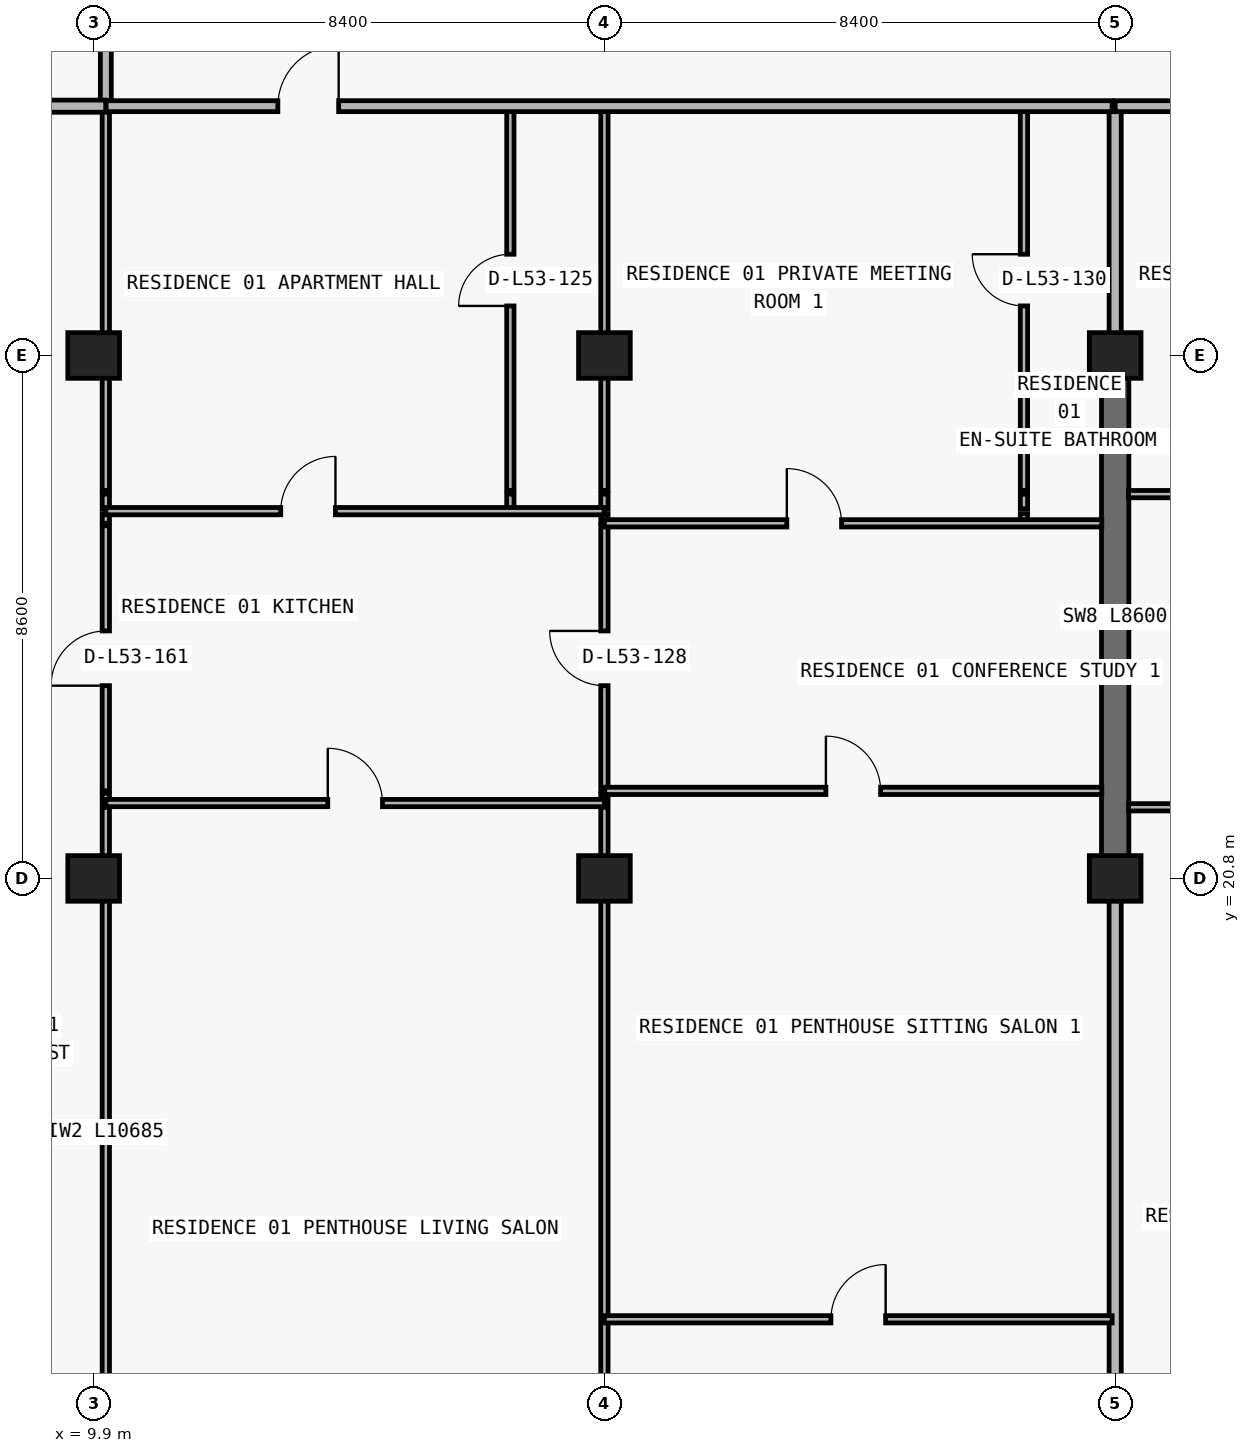
"""IFC4 building model, lengths in metres.
Left out: names, types, materials, properties, quantities, classifications, styles, units other than length and angle.
Written with IfcOpenShell. Run it as: python <this file> out.ifc"""

import sys

from ifc_helpers import new_model, si_unit, direction, frame, frame_2d, origin, origin_2d, place, context, subcontext, project, spatial, rectangle, extrude, element, fill, save


model = new_model("IFC4")
c1 = context("Model", 3, precision=1e-05, world=origin(), true_north=direction((0.0, 1.0)))
c2 = subcontext(c1, "Body", "Model", "MODEL_VIEW")
j1 = project(units=[si_unit("LENGTHUNIT", "METRE"), si_unit("PLANEANGLEUNIT", "RADIAN")], contexts=[c1])
p1 = place(None, origin())
s1 = spatial("IfcSite", under=j1, at=p1, CompositionType="ELEMENT")
p2 = place(p1, origin())
s2 = spatial("IfcBuilding", under=s1, at=p2, CompositionType="ELEMENT")
p3 = place(p2, frame((0.0, 0.0, 191.7)))
s3 = spatial("IfcBuildingStorey", under=s2, at=p3, CompositionType="ELEMENT", Elevation=191.7)
for number, where, z_axis, x_axis in (
    (1, (9.9, 20.8, 0.0), (0.0, 0.0, 1.0), (1.0, 0.0, 0.0)),
    (2, (18.3, 20.8, 0.0), (0.0, 0.0, 1.0), (1.0, 0.0, 0.0)),
    (3, (26.7, 20.8, 0.0), (0.0, 0.0, 1.0), (1.0, 0.0, 0.0)),
    (4, (9.9, 29.4, 0.0), (0.0, 0.0, 1.0), (1.0, 0.0, 0.0)),
    (5, (18.3, 29.4, 0.0), (0.0, 0.0, 1.0), (1.0, 0.0, 0.0)),
    (6, (26.7, 29.4, 0.0), (0.0, 0.0, 1.0), (1.0, 0.0, 0.0)),
):
    element("IfcColumn", number, at=place(p3, frame(where, z_axis=z_axis, x_axis=x_axis)), inside=s3, PredefinedType="COLUMN", context=c2, shape_type="SweptSolid", body=[
        extrude(rectangle(XDim=0.85, YDim=0.75, at=origin_2d()), origin(), (0.0, 0.0, 1.0), 3.05),
    ])
p4 = place(p3, frame((26.7, 20.8, 0.0), z_axis=(0.0, 0.0, 1.0), x_axis=(0.0, 1.0, 0.0)))
e7 = element("IfcWall", 7, at=p4, inside=s3, PredefinedType="SHEAR", context=c2, shape_type="SweptSolid", body=[
    extrude(rectangle(XDim=8.6, YDim=0.45, at=frame_2d((4.3, 0.0))), origin(), (0.0, 0.0, 1.0), 3.05),
])
p5 = place(p3, frame((10.1, 11.285, 0.0), z_axis=(0.0, 0.0, 1.0), x_axis=(0.0, 1.0, 0.0)))
e8 = element("IfcWall", 8, at=p5, inside=s3, PredefinedType="PARTITIONING", context=c2, shape_type="SweptSolid", body=[
    extrude(rectangle(XDim=10.685, YDim=0.12, at=frame_2d((5.343, 0.0))), origin(), (0.0, 0.0, 1.0), 2.263),
])
p6 = place(p3, frame((10.1, 22.04, 0.0), z_axis=(0.0, 0.0, 1.0), x_axis=(0.0, 1.0, 0.0)))
e9 = element("IfcWall", 9, at=p6, inside=s3, PredefinedType="PARTITIONING", context=c2, shape_type="SweptSolid", body=[
    extrude(rectangle(XDim=0.16, YDim=0.12, at=frame_2d((0.08, 0.0))), origin(), (0.0, 0.0, 1.0), 2.263),
])
p7 = place(p3, frame((10.1, 22.24, 0.0), z_axis=(0.0, 0.0, 1.0), x_axis=(0.0, 1.0, 0.0)))
e10 = element("IfcWall", 10, at=p7, inside=s3, PredefinedType="PARTITIONING", context=c2, shape_type="SweptSolid", body=[
    extrude(rectangle(XDim=4.36, YDim=0.12, at=frame_2d((2.18, 0.0))), origin(), (0.0, 0.0, 1.0), 2.263),
])
p8 = place(p7, frame((1.73, 0.0, 0.0)))
e11 = element("IfcOpeningElement", 11, at=p8, cuts=e10, PredefinedType="OPENING", context=c2, shape_type="SweptSolid", body=[
    extrude(rectangle(XDim=0.9, YDim=2.15, at=frame_2d((0.45, 1.075))), frame((0.0, 0.07, 0.0), z_axis=(0.0, -1.0, 0.0), x_axis=(1.0, 0.0, 0.0)), (0.0, 0.0, 1.0), 0.14),
])
p9 = place(p3, frame((10.1, 26.64, 0.0), z_axis=(0.0, 0.0, 1.0), x_axis=(0.0, 1.0, 0.0)))
e12 = element("IfcWall", 12, at=p9, inside=s3, PredefinedType="PARTITIONING", context=c2, shape_type="SweptSolid", body=[
    extrude(rectangle(XDim=0.16, YDim=0.12, at=frame_2d((0.08, 0.0))), origin(), (0.0, 0.0, 1.0), 2.263),
])
p10 = place(p3, frame((10.1, 26.88, 0.0), z_axis=(0.0, 0.0, 1.0), x_axis=(0.0, 1.0, 0.0)))
e13 = element("IfcWall", 13, at=p10, inside=s3, PredefinedType="PARTITIONING", context=c2, shape_type="SweptSolid", body=[
    extrude(rectangle(XDim=0.24, YDim=0.12, at=frame_2d((0.12, 0.0))), origin(), (0.0, 0.0, 1.0), 2.263),
])
p11 = place(p3, frame((10.1, 27.18, 0.0), z_axis=(0.0, 0.0, 1.0), x_axis=(0.0, 1.0, 0.0)))
e14 = element("IfcWall", 14, at=p11, inside=s3, PredefinedType="PARTITIONING", context=c2, shape_type="SweptSolid", body=[
    extrude(rectangle(XDim=6.32, YDim=0.12, at=frame_2d((3.16, 0.0))), origin(), (0.0, 0.0, 1.0), 2.263),
])
p12 = place(p3, frame((10.1, 33.505, 0.0), z_axis=(0.0, 0.0, 1.0), x_axis=(0.0, 1.0, 0.0)))
e15 = element("IfcWall", 15, at=p12, inside=s3, PredefinedType="PARTITIONING", context=c2, shape_type="SweptSolid", body=[
    extrude(rectangle(XDim=3.495, YDim=0.18, at=frame_2d((1.748, 0.0))), origin(), (0.0, 0.0, 1.0), 2.263),
])
p13 = place(p3, frame((16.753, 26.88, 0.0), z_axis=(0.0, 0.0, 1.0), x_axis=(0.0, 1.0, 0.0)))
e16 = element("IfcWall", 16, at=p13, inside=s3, PredefinedType="PARTITIONING", context=c2, shape_type="SweptSolid", body=[
    extrude(rectangle(XDim=0.24, YDim=0.12, at=frame_2d((0.12, 0.0))), origin(), (0.0, 0.0, 1.0), 3.05),
])
p14 = place(p3, frame((16.753, 27.18, 0.0), z_axis=(0.0, 0.0, 1.0), x_axis=(0.0, 1.0, 0.0)))
e17 = element("IfcWall", 17, at=p14, inside=s3, PredefinedType="PARTITIONING", context=c2, shape_type="SweptSolid", body=[
    extrude(rectangle(XDim=6.32, YDim=0.12, at=frame_2d((3.16, 0.0))), origin(), (0.0, 0.0, 1.0), 3.05),
])
p15 = place(p14, frame((3.035, 0.0, 0.0)))
e18 = element("IfcOpeningElement", 18, at=p15, cuts=e17, PredefinedType="OPENING", context=c2, shape_type="SweptSolid", body=[
    extrude(rectangle(XDim=0.85, YDim=2.1, at=frame_2d((0.425, 1.05))), frame((0.0, 0.07, 0.0), z_axis=(0.0, -1.0, 0.0), x_axis=(1.0, 0.0, 0.0)), (0.0, 0.0, 1.0), 0.14),
])
p16 = place(p3, frame((18.3, 11.24, 0.0), z_axis=(0.0, 0.0, 1.0), x_axis=(0.0, 1.0, 0.0)))
e19 = element("IfcWall", 19, at=p16, inside=s3, PredefinedType="PARTITIONING", context=c2, shape_type="SweptSolid", body=[
    extrude(rectangle(XDim=10.73, YDim=0.12, at=frame_2d((5.365, 0.0))), origin(), (0.0, 0.0, 1.0), 2.263),
])
p17 = place(p3, frame((18.3, 22.04, 0.0), z_axis=(0.0, 0.0, 1.0), x_axis=(0.0, 1.0, 0.0)))
e20 = element("IfcWall", 20, at=p17, inside=s3, PredefinedType="PARTITIONING", context=c2, shape_type="SweptSolid", body=[
    extrude(rectangle(XDim=0.16, YDim=0.12, at=frame_2d((0.08, 0.0))), origin(), (0.0, 0.0, 1.0), 2.263),
])
p18 = place(p3, frame((18.3, 22.24, 0.0), z_axis=(0.0, 0.0, 1.0), x_axis=(0.0, 1.0, 0.0)))
e21 = element("IfcWall", 21, at=p18, inside=s3, PredefinedType="PARTITIONING", context=c2, shape_type="SweptSolid", body=[
    extrude(rectangle(XDim=4.36, YDim=0.12, at=frame_2d((2.18, 0.0))), origin(), (0.0, 0.0, 1.0), 2.263),
])
p19 = place(p18, frame((1.73, 0.0, 0.0)))
e22 = element("IfcOpeningElement", 22, at=p19, cuts=e21, PredefinedType="OPENING", context=c2, shape_type="SweptSolid", body=[
    extrude(rectangle(XDim=0.9, YDim=2.15, at=frame_2d((0.45, 1.075))), frame((0.0, 0.07, 0.0), z_axis=(0.0, -1.0, 0.0), x_axis=(1.0, 0.0, 0.0)), (0.0, 0.0, 1.0), 0.14),
])
p20 = place(p3, frame((18.3, 26.64, 0.0), z_axis=(0.0, 0.0, 1.0), x_axis=(0.0, 1.0, 0.0)))
e23 = element("IfcWall", 23, at=p20, inside=s3, PredefinedType="PARTITIONING", context=c2, shape_type="SweptSolid", body=[
    extrude(rectangle(XDim=0.16, YDim=0.12, at=frame_2d((0.08, 0.0))), origin(), (0.0, 0.0, 1.0), 2.263),
])
p21 = place(p3, frame((18.3, 26.88, 0.0), z_axis=(0.0, 0.0, 1.0), x_axis=(0.0, 1.0, 0.0)))
e24 = element("IfcWall", 24, at=p21, inside=s3, PredefinedType="PARTITIONING", context=c2, shape_type="SweptSolid", body=[
    extrude(rectangle(XDim=0.24, YDim=0.12, at=frame_2d((0.12, 0.0))), origin(), (0.0, 0.0, 1.0), 2.263),
])
p22 = place(p3, frame((18.3, 27.18, 0.0), z_axis=(0.0, 0.0, 1.0), x_axis=(0.0, 1.0, 0.0)))
e25 = element("IfcWall", 25, at=p22, inside=s3, PredefinedType="PARTITIONING", context=c2, shape_type="SweptSolid", body=[
    extrude(rectangle(XDim=6.32, YDim=0.12, at=frame_2d((3.16, 0.0))), origin(), (0.0, 0.0, 1.0), 2.263),
])
p23 = place(p3, frame((25.2, 26.64, 0.0), z_axis=(0.0, 0.0, 1.0), x_axis=(0.0, 1.0, 0.0)))
e26 = element("IfcWall", 26, at=p23, inside=s3, PredefinedType="PARTITIONING", context=c2, shape_type="SweptSolid", body=[
    extrude(rectangle(XDim=0.16, YDim=0.12, at=frame_2d((0.08, 0.0))), origin(), (0.0, 0.0, 1.0), 3.05),
])
p24 = place(p3, frame((25.2, 26.88, 0.0), z_axis=(0.0, 0.0, 1.0), x_axis=(0.0, 1.0, 0.0)))
e27 = element("IfcWall", 27, at=p24, inside=s3, PredefinedType="PARTITIONING", context=c2, shape_type="SweptSolid", body=[
    extrude(rectangle(XDim=0.24, YDim=0.12, at=frame_2d((0.12, 0.0))), origin(), (0.0, 0.0, 1.0), 3.05),
])
p25 = place(p3, frame((25.2, 27.18, 0.0), z_axis=(0.0, 0.0, 1.0), x_axis=(0.0, 1.0, 0.0)))
e28 = element("IfcWall", 28, at=p25, inside=s3, PredefinedType="PARTITIONING", context=c2, shape_type="SweptSolid", body=[
    extrude(rectangle(XDim=6.32, YDim=0.12, at=frame_2d((3.16, 0.0))), origin(), (0.0, 0.0, 1.0), 3.05),
])
p26 = place(p25, frame((3.035, 0.0, 0.0)))
e29 = element("IfcOpeningElement", 29, at=p26, cuts=e28, PredefinedType="OPENING", context=c2, shape_type="SweptSolid", body=[
    extrude(rectangle(XDim=0.85, YDim=2.1, at=frame_2d((0.425, 1.05))), frame((0.0, 0.07, 0.0), z_axis=(0.0, -1.0, 0.0), x_axis=(1.0, 0.0, 0.0)), (0.0, 0.0, 1.0), 0.14),
])
p27 = place(p3, frame((26.7, 11.24, 0.0), z_axis=(0.0, 0.0, 1.0), x_axis=(0.0, 1.0, 0.0)))
e30 = element("IfcWall", 30, at=p27, inside=s3, PredefinedType="PARTITIONING", context=c2, shape_type="SweptSolid", body=[
    extrude(rectangle(XDim=9.555, YDim=0.2, at=frame_2d((4.777, 0.0))), origin(), (0.0, 0.0, 1.0), 2.263),
])
p28 = place(p3, frame((26.7, 29.405, 0.0), z_axis=(0.0, 0.0, 1.0), x_axis=(0.0, 1.0, 0.0)))
e31 = element("IfcWall", 31, at=p28, inside=s3, PredefinedType="PARTITIONING", context=c2, shape_type="SweptSolid", body=[
    extrude(rectangle(XDim=4.095, YDim=0.2, at=frame_2d((2.047, 0.0))), origin(), (0.0, 0.0, 1.0), 2.335),
])
p29 = place(p3, frame((18.3, 13.55, 0.0), z_axis=(0.0, 0.0, 1.0), x_axis=(1.0, 0.0, 0.0)))
e32 = element("IfcWall", 32, at=p29, inside=s3, PredefinedType="PARTITIONING", context=c2, shape_type="SweptSolid", body=[
    extrude(rectangle(XDim=8.35, YDim=0.12, at=frame_2d((4.175, 0.0))), origin(), (0.0, 0.0, 1.0), 3.05),
])
p30 = place(p29, frame((3.725, 0.0, 0.0)))
e33 = element("IfcOpeningElement", 33, at=p30, cuts=e32, PredefinedType="OPENING", context=c2, shape_type="SweptSolid", body=[
    extrude(rectangle(XDim=0.9, YDim=2.15, at=frame_2d((0.45, 1.075))), frame((0.0, 0.07, 0.0), z_axis=(0.0, -1.0, 0.0), x_axis=(1.0, 0.0, 0.0)), (0.0, 0.0, 1.0), 0.14),
])
p31 = place(p3, frame((26.92, 21.97, 0.0), z_axis=(0.0, 0.0, 1.0), x_axis=(1.0, 0.0, 0.0)))
e34 = element("IfcWall", 34, at=p31, inside=s3, PredefinedType="PARTITIONING", context=c2, shape_type="SweptSolid", body=[
    extrude(rectangle(XDim=4.4, YDim=0.12, at=frame_2d((2.2, 0.0))), origin(), (0.0, 0.0, 1.0), 3.05),
])
p32 = place(p31, frame((1.75, 0.0, 0.0)))
e35 = element("IfcOpeningElement", 35, at=p32, cuts=e34, PredefinedType="OPENING", context=c2, shape_type="SweptSolid", body=[
    extrude(rectangle(XDim=0.9, YDim=2.15, at=frame_2d((0.45, 1.075))), frame((0.0, 0.07, 0.0), z_axis=(0.0, -1.0, 0.0), x_axis=(1.0, 0.0, 0.0)), (0.0, 0.0, 1.0), 0.14),
])
p33 = place(p3, frame((10.1, 22.04, 0.0), z_axis=(0.0, 0.0, 1.0), x_axis=(1.0, 0.0, 0.0)))
e36 = element("IfcWall", 36, at=p33, inside=s3, PredefinedType="PARTITIONING", context=c2, shape_type="SweptSolid", body=[
    extrude(rectangle(XDim=8.2, YDim=0.12, at=frame_2d((4.1, 0.0))), origin(), (0.0, 0.0, 1.0), 3.05),
])
p34 = place(p33, frame((3.65, 0.0, 0.0)))
e37 = element("IfcOpeningElement", 37, at=p34, cuts=e36, PredefinedType="OPENING", context=c2, shape_type="SweptSolid", body=[
    extrude(rectangle(XDim=0.9, YDim=2.15, at=frame_2d((0.45, 1.075))), frame((0.0, 0.07, 0.0), z_axis=(0.0, -1.0, 0.0), x_axis=(1.0, 0.0, 0.0)), (0.0, 0.0, 1.0), 0.14),
])
p35 = place(p3, frame((18.305, 22.24, 0.0), z_axis=(0.0, 0.0, 1.0), x_axis=(1.0, 0.0, 0.0)))
e38 = element("IfcWall", 38, at=p35, inside=s3, PredefinedType="PARTITIONING", context=c2, shape_type="SweptSolid", body=[
    extrude(rectangle(XDim=8.175, YDim=0.12, at=frame_2d((4.087, 0.0))), origin(), (0.0, 0.0, 1.0), 3.05),
])
p36 = place(p35, frame((3.637, 0.0, 0.0)))
e39 = element("IfcOpeningElement", 39, at=p36, cuts=e38, PredefinedType="OPENING", context=c2, shape_type="SweptSolid", body=[
    extrude(rectangle(XDim=0.9, YDim=2.15, at=frame_2d((0.45, 1.075))), frame((0.0, 0.07, 0.0), z_axis=(0.0, -1.0, 0.0), x_axis=(1.0, 0.0, 0.0)), (0.0, 0.0, 1.0), 0.14),
])
p37 = place(p3, frame((18.3, 26.64, 0.0), z_axis=(0.0, 0.0, 1.0), x_axis=(1.0, 0.0, 0.0)))
e40 = element("IfcWall", 40, at=p37, inside=s3, PredefinedType="PARTITIONING", context=c2, shape_type="SweptSolid", body=[
    extrude(rectangle(XDim=8.18, YDim=0.12, at=frame_2d((4.09, 0.0))), origin(), (0.0, 0.0, 1.0), 3.05),
])
p38 = place(p37, frame((3.0, 0.0, 0.0)))
e41 = element("IfcOpeningElement", 41, at=p38, cuts=e40, PredefinedType="OPENING", context=c2, shape_type="SweptSolid", body=[
    extrude(rectangle(XDim=0.9, YDim=2.15, at=frame_2d((0.45, 1.075))), frame((0.0, 0.07, 0.0), z_axis=(0.0, -1.0, 0.0), x_axis=(1.0, 0.0, 0.0)), (0.0, 0.0, 1.0), 0.14),
])
p39 = place(p3, frame((10.1, 26.84, 0.0), z_axis=(0.0, 0.0, 1.0), x_axis=(1.0, 0.0, 0.0)))
e42 = element("IfcWall", 42, at=p39, inside=s3, PredefinedType="PARTITIONING", context=c2, shape_type="SweptSolid", body=[
    extrude(rectangle(XDim=8.195, YDim=0.12, at=frame_2d((4.097, 0.0))), origin(), (0.0, 0.0, 1.0), 3.05),
])
p40 = place(p39, frame((2.876, 0.0, 0.0)))
e43 = element("IfcOpeningElement", 43, at=p40, cuts=e42, PredefinedType="OPENING", context=c2, shape_type="SweptSolid", body=[
    extrude(rectangle(XDim=0.9, YDim=2.15, at=frame_2d((0.45, 1.075))), frame((0.0, 0.07, 0.0), z_axis=(0.0, -1.0, 0.0), x_axis=(1.0, 0.0, 0.0)), (0.0, 0.0, 1.0), 0.14),
])
p41 = place(p3, frame((26.92, 27.12, 0.0), z_axis=(0.0, 0.0, 1.0), x_axis=(1.0, 0.0, 0.0)))
e44 = element("IfcWall", 44, at=p41, inside=s3, PredefinedType="PARTITIONING", context=c2, shape_type="SweptSolid", body=[
    extrude(rectangle(XDim=4.4, YDim=0.12, at=frame_2d((2.2, 0.0))), origin(), (0.0, 0.0, 1.0), 3.05),
])
p42 = place(p41, frame((1.75, 0.0, 0.0)))
e45 = element("IfcOpeningElement", 45, at=p42, cuts=e44, PredefinedType="OPENING", context=c2, shape_type="SweptSolid", body=[
    extrude(rectangle(XDim=0.9, YDim=2.15, at=frame_2d((0.45, 1.075))), frame((0.0, 0.07, 0.0), z_axis=(0.0, -1.0, 0.0), x_axis=(1.0, 0.0, 0.0)), (0.0, 0.0, 1.0), 0.14),
])
p43 = place(p3, frame((6.395, 33.5, 0.0), z_axis=(0.0, 0.0, 1.0), x_axis=(1.0, 0.0, 0.0)))
e46 = element("IfcWall", 46, at=p43, inside=s3, PredefinedType="PARTITIONING", context=c2, shape_type="SweptSolid", body=[
    extrude(rectangle(XDim=3.705, YDim=0.2, at=frame_2d((1.853, 0.0))), origin(), (0.0, 0.0, 1.0), 3.05),
])
p44 = place(p3, frame((10.105, 33.5, 0.0), z_axis=(0.0, 0.0, 1.0), x_axis=(1.0, 0.0, 0.0)))
e47 = element("IfcWall", 47, at=p44, inside=s3, PredefinedType="PARTITIONING", context=c2, shape_type="SweptSolid", body=[
    extrude(rectangle(XDim=16.545, YDim=0.18, at=frame_2d((8.272, 0.0))), origin(), (0.0, 0.0, 1.0), 3.05),
])
p45 = place(p44, frame((2.824, 0.0, 0.0)))
e48 = element("IfcOpeningElement", 48, at=p45, cuts=e47, PredefinedType="OPENING", context=c2, shape_type="SweptSolid", body=[
    extrude(rectangle(XDim=1.0, YDim=2.2, at=frame_2d((0.5, 1.1))), frame((0.0, 0.1, 0.0), z_axis=(0.0, -1.0, 0.0), x_axis=(1.0, 0.0, 0.0)), (0.0, 0.0, 1.0), 0.2),
])
p46 = place(p3, frame((26.7, 33.5, 0.0), z_axis=(0.0, 0.0, 1.0), x_axis=(1.0, 0.0, 0.0)))
e49 = element("IfcWall", 49, at=p46, inside=s3, PredefinedType="PARTITIONING", context=c2, shape_type="SweptSolid", body=[
    extrude(rectangle(XDim=4.62, YDim=0.18, at=frame_2d((2.31, 0.0))), origin(), (0.0, 0.0, 1.0), 3.05),
])
p47 = place(p46, frame((1.81, 0.0, 0.0)))
e50 = element("IfcOpeningElement", 50, at=p47, cuts=e49, PredefinedType="OPENING", context=c2, shape_type="SweptSolid", body=[
    extrude(rectangle(XDim=1.0, YDim=2.2, at=frame_2d((0.5, 1.1))), frame((0.0, 0.1, 0.0), z_axis=(0.0, -1.0, 0.0), x_axis=(1.0, 0.0, 0.0)), (0.0, 0.0, 1.0), 0.2),
])
p48 = place(p45, origin())
e51 = element("IfcDoor", 51, at=p48, inside=s3, OperationType="SINGLE_SWING_RIGHT", PredefinedType="DOOR", context=c2, shape_type="SweptSolid", body=[
    extrude(rectangle(XDim=1.0, YDim=2.2, at=frame_2d((0.5, 1.1))), frame((0.0, 0.025, 0.0), z_axis=(0.0, -1.0, 0.0), x_axis=(1.0, 0.0, 0.0)), (0.0, 0.0, 1.0), 0.05),
])
fill(e48, e51)
p49 = place(p15, origin())
e52 = element("IfcDoor", 52, at=p49, inside=s3, OperationType="SINGLE_SWING_LEFT", PredefinedType="DOOR", context=c2, shape_type="SweptSolid", body=[
    extrude(rectangle(XDim=0.85, YDim=2.1, at=frame_2d((0.425, 1.05))), frame((0.0, 0.025, 0.0), z_axis=(0.0, -1.0, 0.0), x_axis=(1.0, 0.0, 0.0)), (0.0, 0.0, 1.0), 0.05),
])
fill(e18, e52)
p50 = place(p40, origin())
e53 = element("IfcDoor", 53, at=p50, inside=s3, OperationType="SINGLE_SWING_RIGHT", PredefinedType="DOOR", context=c2, shape_type="SweptSolid", body=[
    extrude(rectangle(XDim=0.9, YDim=2.15, at=frame_2d((0.45, 1.075))), frame((0.0, 0.025, 0.0), z_axis=(0.0, -1.0, 0.0), x_axis=(1.0, 0.0, 0.0)), (0.0, 0.0, 1.0), 0.05),
])
fill(e43, e53)
p51 = place(p34, origin())
e54 = element("IfcDoor", 54, at=p51, inside=s3, OperationType="SINGLE_SWING_LEFT", PredefinedType="DOOR", context=c2, shape_type="SweptSolid", body=[
    extrude(rectangle(XDim=0.9, YDim=2.15, at=frame_2d((0.45, 1.075))), frame((0.0, 0.025, 0.0), z_axis=(0.0, -1.0, 0.0), x_axis=(1.0, 0.0, 0.0)), (0.0, 0.0, 1.0), 0.05),
])
fill(e37, e54)
p52 = place(p19, origin())
e55 = element("IfcDoor", 55, at=p52, inside=s3, OperationType="SINGLE_SWING_RIGHT", PredefinedType="DOOR", context=c2, shape_type="SweptSolid", body=[
    extrude(rectangle(XDim=0.9, YDim=2.15, at=frame_2d((0.45, 1.075))), frame((0.0, 0.025, 0.0), z_axis=(0.0, -1.0, 0.0), x_axis=(1.0, 0.0, 0.0)), (0.0, 0.0, 1.0), 0.05),
])
fill(e22, e55)
p53 = place(p38, origin())
e56 = element("IfcDoor", 56, at=p53, inside=s3, OperationType="SINGLE_SWING_LEFT", PredefinedType="DOOR", context=c2, shape_type="SweptSolid", body=[
    extrude(rectangle(XDim=0.9, YDim=2.15, at=frame_2d((0.45, 1.075))), frame((0.0, 0.025, 0.0), z_axis=(0.0, -1.0, 0.0), x_axis=(1.0, 0.0, 0.0)), (0.0, 0.0, 1.0), 0.05),
])
fill(e41, e56)
p54 = place(p26, origin())
e57 = element("IfcDoor", 57, at=p54, inside=s3, OperationType="SINGLE_SWING_RIGHT", PredefinedType="DOOR", context=c2, shape_type="SweptSolid", body=[
    extrude(rectangle(XDim=0.85, YDim=2.1, at=frame_2d((0.425, 1.05))), frame((0.0, 0.025, 0.0), z_axis=(0.0, -1.0, 0.0), x_axis=(1.0, 0.0, 0.0)), (0.0, 0.0, 1.0), 0.05),
])
fill(e29, e57)
p55 = place(p36, origin())
e58 = element("IfcDoor", 58, at=p55, inside=s3, OperationType="SINGLE_SWING_LEFT", PredefinedType="DOOR", context=c2, shape_type="SweptSolid", body=[
    extrude(rectangle(XDim=0.9, YDim=2.15, at=frame_2d((0.45, 1.075))), frame((0.0, 0.025, 0.0), z_axis=(0.0, -1.0, 0.0), x_axis=(1.0, 0.0, 0.0)), (0.0, 0.0, 1.0), 0.05),
])
fill(e39, e58)
p56 = place(p30, origin())
e59 = element("IfcDoor", 59, at=p56, inside=s3, OperationType="SINGLE_SWING_RIGHT", PredefinedType="DOOR", context=c2, shape_type="SweptSolid", body=[
    extrude(rectangle(XDim=0.9, YDim=2.15, at=frame_2d((0.45, 1.075))), frame((0.0, 0.025, 0.0), z_axis=(0.0, -1.0, 0.0), x_axis=(1.0, 0.0, 0.0)), (0.0, 0.0, 1.0), 0.05),
])
fill(e33, e59)
p57 = place(p8, origin())
e60 = element("IfcDoor", 60, at=p57, inside=s3, OperationType="SINGLE_SWING_LEFT", PredefinedType="DOOR", context=c2, shape_type="SweptSolid", body=[
    extrude(rectangle(XDim=0.9, YDim=2.15, at=frame_2d((0.45, 1.075))), frame((0.0, 0.025, 0.0), z_axis=(0.0, -1.0, 0.0), x_axis=(1.0, 0.0, 0.0)), (0.0, 0.0, 1.0), 0.05),
])
fill(e11, e60)
save(model, sys.argv[1])
